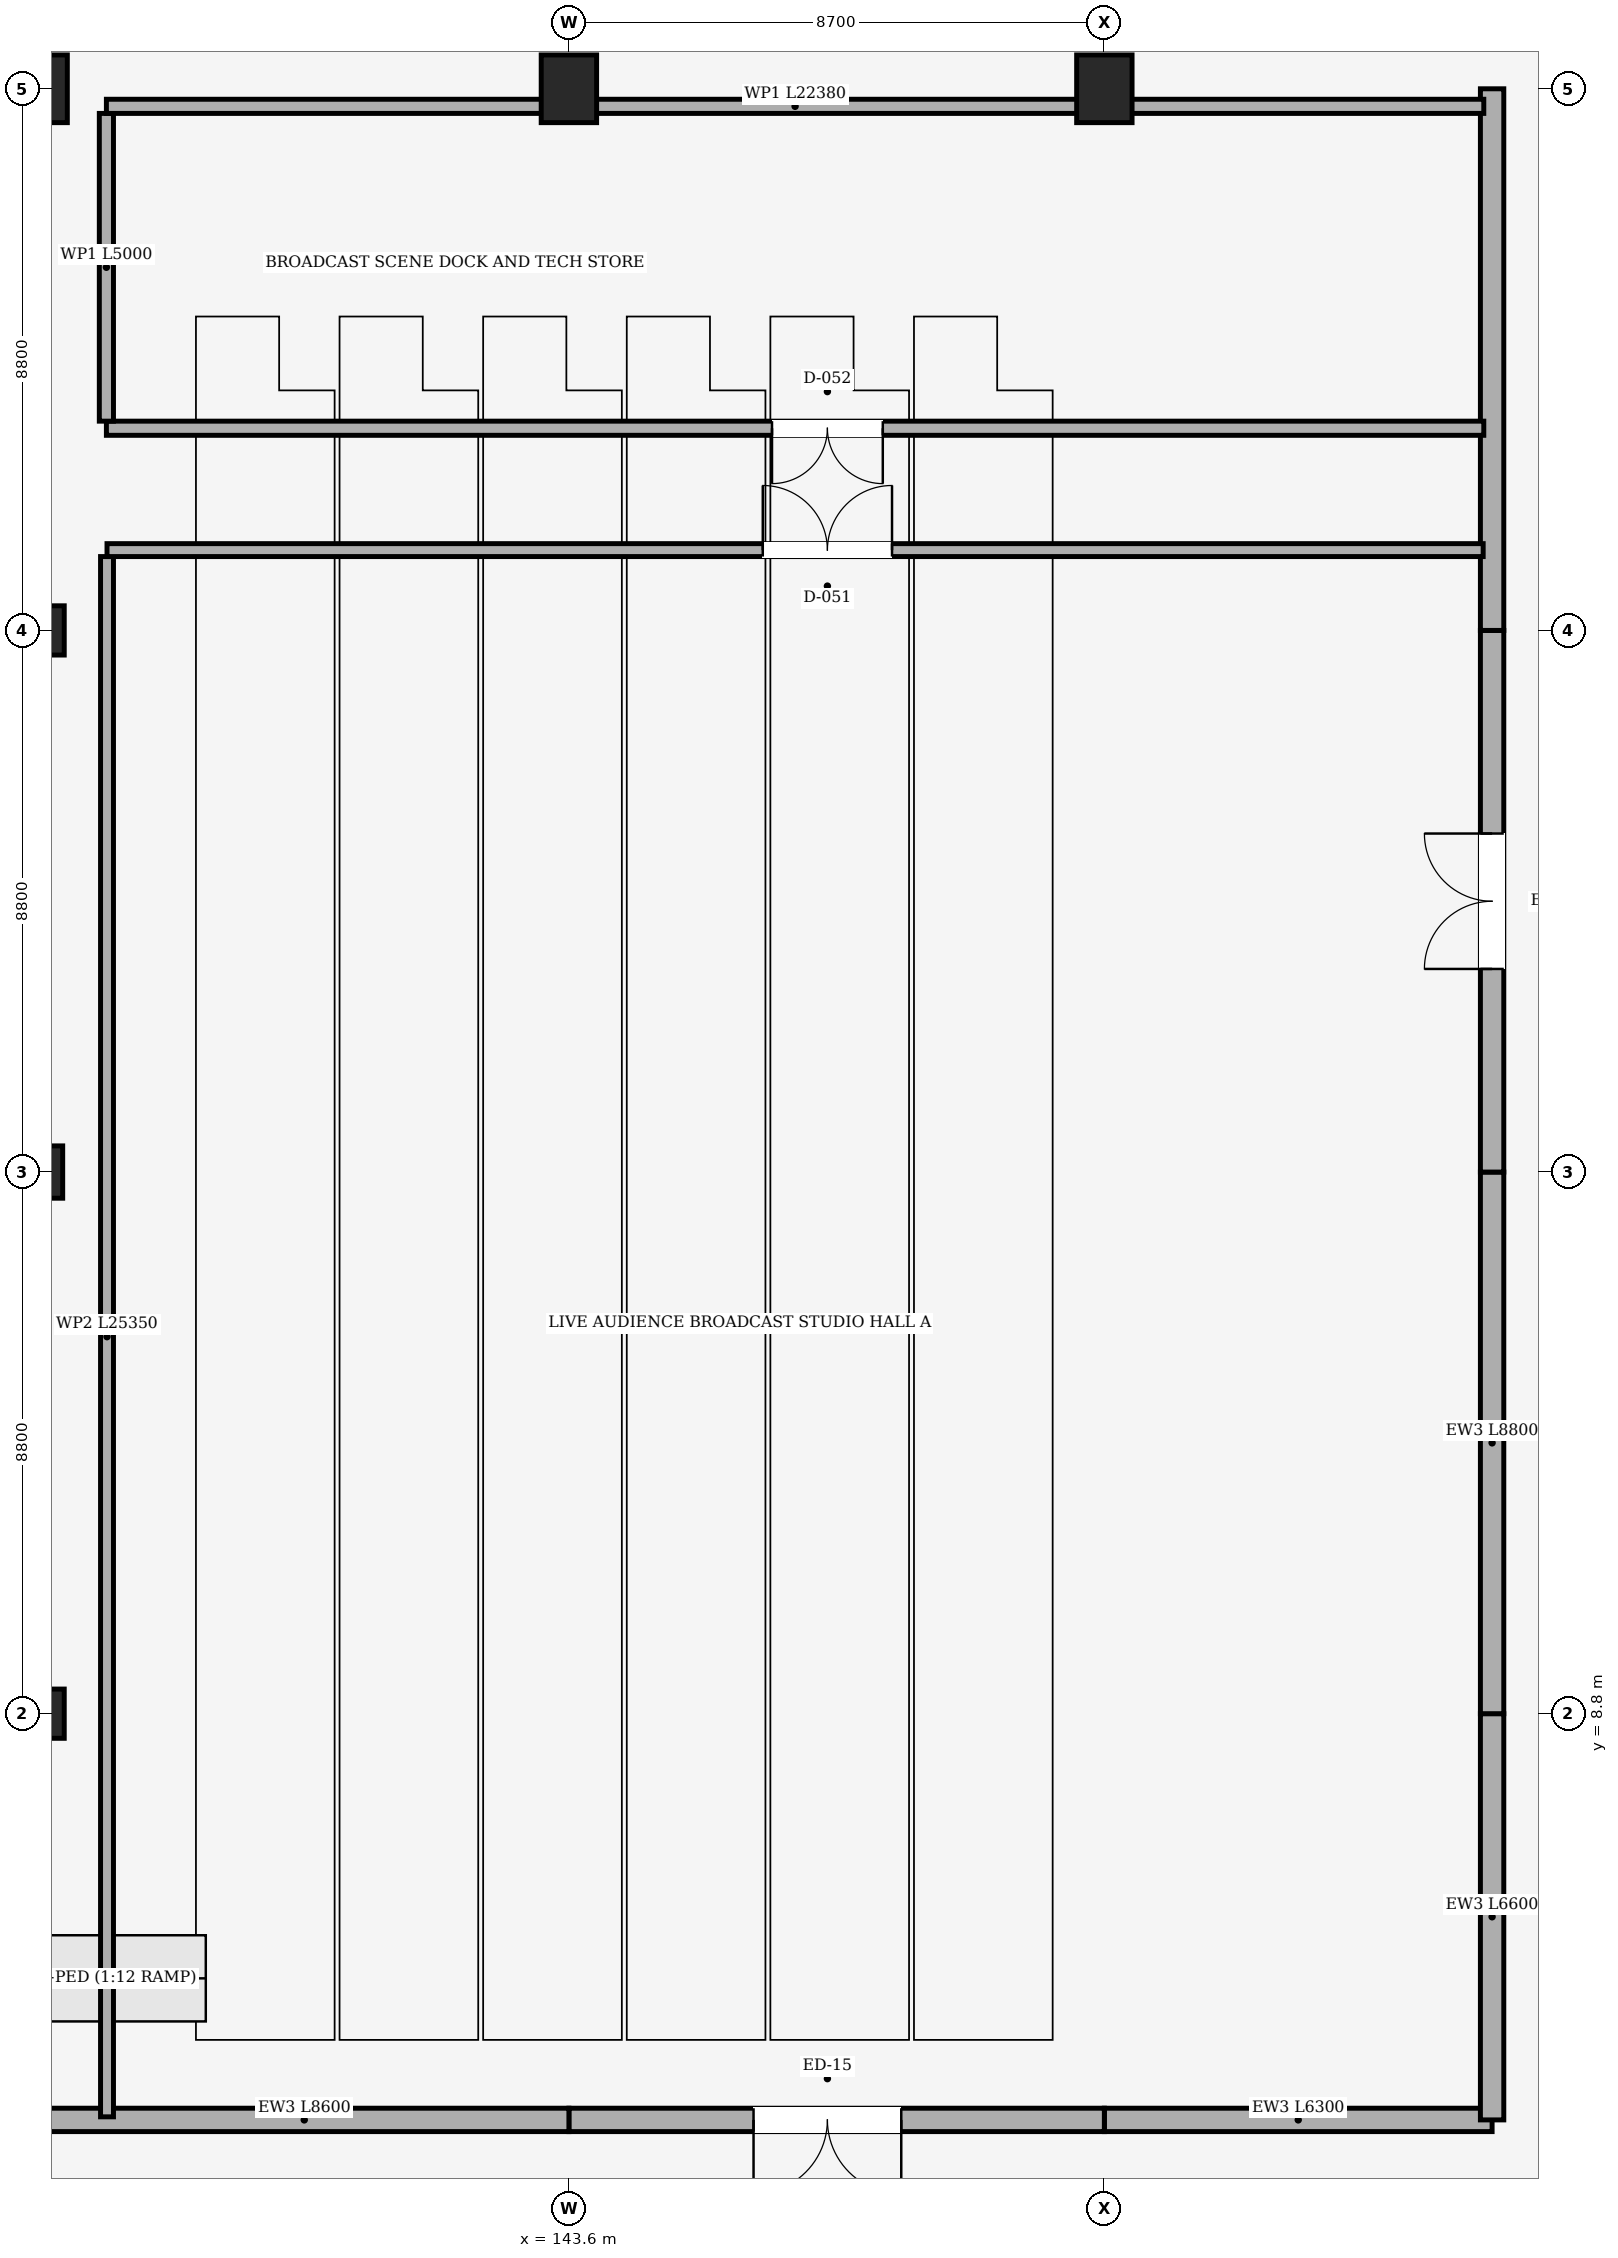
"""IFC4 building model, lengths in metres.
Left out: names, types, materials, properties, quantities, classifications, styles, units other than length and angle.
Written with IfcOpenShell. Run it as: python <this file> out.ifc"""

import sys

from ifc_helpers import new_model, si_unit, direction, frame, frame_2d, origin, origin_2d, place, context, subcontext, project, spatial, rectangle, extrude, element, fill, save


model = new_model("IFC4")
c1 = context("Model", 3, precision=1e-05, world=origin(), true_north=direction((0.0, 1.0)))
c2 = subcontext(c1, "Body", "Model", "MODEL_VIEW")
j1 = project(units=[si_unit("LENGTHUNIT", "METRE"), si_unit("PLANEANGLEUNIT", "RADIAN")], contexts=[c1])
p1 = place(None, origin())
s1 = spatial("IfcSite", under=j1, at=p1, CompositionType="ELEMENT")
p2 = place(p1, origin())
s2 = spatial("IfcBuilding", under=s1, at=p2, CompositionType="ELEMENT")
p3 = place(p2, origin())
s3 = spatial("IfcBuildingStorey", under=s2, at=p3, CompositionType="ELEMENT", Elevation=0.0)
p4 = place(p3, frame((135.0, 8.8, 0.0), z_axis=(0.0, 0.0, 1.0), x_axis=(1.0, 0.0, 0.0)))
e1 = element("IfcColumn", 1, at=p4, inside=s3, PredefinedType="COLUMN", context=c2, shape_type="SweptSolid", body=[
    extrude(rectangle(XDim=0.8, YDim=0.8, at=origin_2d()), origin(), (0.0, 0.0, 1.0), 4.5),
])
p5 = place(p3, frame((135.0, 17.6, 0.0), z_axis=(0.0, 0.0, 1.0), x_axis=(1.0, 0.0, 0.0)))
e2 = element("IfcColumn", 2, at=p5, inside=s3, PredefinedType="COLUMN", context=c2, shape_type="SweptSolid", body=[
    extrude(rectangle(XDim=0.75, YDim=0.85, at=origin_2d()), origin(), (0.0, 0.0, 1.0), 4.5),
])
p6 = place(p3, frame((135.0, 26.4, 0.0), z_axis=(0.0, 0.0, 1.0), x_axis=(1.0, 0.0, 0.0)))
e3 = element("IfcColumn", 3, at=p6, inside=s3, PredefinedType="COLUMN", context=c2, shape_type="SweptSolid", body=[
    extrude(rectangle(XDim=0.8, YDim=0.8, at=origin_2d()), origin(), (0.0, 0.0, 1.0), 4.5),
])
for number, where, z_axis, x_axis in (
    (4, (135.0, 35.2, 0.0), (0.0, 0.0, 1.0), (1.0, 0.0, 0.0)),
    (5, (143.6, 35.2, 0.0), (0.0, 0.0, 1.0), (1.0, 0.0, 0.0)),
    (6, (152.3, 35.2, 0.0), (0.0, 0.0, 1.0), (1.0, 0.0, 0.0)),
):
    element("IfcColumn", number, at=place(p3, frame(where, z_axis=z_axis, x_axis=x_axis)), inside=s3, PredefinedType="COLUMN", context=c2, shape_type="SweptSolid", body=[
        extrude(rectangle(XDim=0.9, YDim=1.1, at=origin_2d()), origin(), (0.0, 0.0, 1.0), 4.25),
    ])
p7 = place(p3, frame((158.6, 2.2, 0.0), z_axis=(0.0, 0.0, 1.0), x_axis=(-1.0, 0.0, 0.0)))
e7 = element("IfcWall", 7, at=p7, inside=s3, PredefinedType="SOLIDWALL", context=c2, shape_type="SweptSolid", body=[
    extrude(rectangle(XDim=6.3, YDim=0.38, at=frame_2d((3.15, 0.0))), origin(), (0.0, 0.0, 1.0), 4.235),
])
p8 = place(p3, frame((152.3, 2.2, 0.0), z_axis=(0.0, 0.0, 1.0), x_axis=(-1.0, 0.0, 0.0)))
e8 = element("IfcWall", 8, at=p8, inside=s3, PredefinedType="SOLIDWALL", context=c2, shape_type="SweptSolid", body=[
    extrude(rectangle(XDim=8.7, YDim=0.38, at=frame_2d((4.35, 0.0))), origin(), (0.0, 0.0, 1.0), 4.235),
])
p9 = place(p8, frame((3.3, 0.0, 0.0)))
e9 = element("IfcOpeningElement", 9, at=p9, cuts=e8, PredefinedType="OPENING", context=c2, shape_type="SweptSolid", body=[
    extrude(rectangle(XDim=2.4, YDim=2.3, at=frame_2d((1.2, 1.15))), frame((0.0, 0.19, 0.0), z_axis=(0.0, -1.0, 0.0), x_axis=(1.0, 0.0, 0.0)), (0.0, 0.0, 1.0), 0.38),
])
p10 = place(p3, frame((143.6, 2.2, 0.0), z_axis=(0.0, 0.0, 1.0), x_axis=(-1.0, 0.0, 0.0)))
e10 = element("IfcWall", 10, at=p10, inside=s3, PredefinedType="SOLIDWALL", context=c2, shape_type="SweptSolid", body=[
    extrude(rectangle(XDim=8.6, YDim=0.38, at=frame_2d((4.3, 0.0))), origin(), (0.0, 0.0, 1.0), 4.235),
])
p11 = place(p3, frame((158.6, 2.2, 0.0), z_axis=(0.0, 0.0, 1.0), x_axis=(0.0, 1.0, 0.0)))
e11 = element("IfcWall", 11, at=p11, inside=s3, PredefinedType="SOLIDWALL", context=c2, shape_type="SweptSolid", body=[
    extrude(rectangle(XDim=6.6, YDim=0.38, at=frame_2d((3.3, 0.0))), origin(), (0.0, 0.0, 1.0), 4.235),
])
p12 = place(p3, frame((158.6, 8.8, 0.0), z_axis=(0.0, 0.0, 1.0), x_axis=(0.0, 1.0, 0.0)))
e12 = element("IfcWall", 12, at=p12, inside=s3, PredefinedType="SOLIDWALL", context=c2, shape_type="SweptSolid", body=[
    extrude(rectangle(XDim=8.8, YDim=0.38, at=frame_2d((4.4, 0.0))), origin(), (0.0, 0.0, 1.0), 4.235),
])
p13 = place(p3, frame((158.6, 17.6, 0.0), z_axis=(0.0, 0.0, 1.0), x_axis=(0.0, 1.0, 0.0)))
e13 = element("IfcWall", 13, at=p13, inside=s3, PredefinedType="SOLIDWALL", context=c2, shape_type="SweptSolid", body=[
    extrude(rectangle(XDim=8.8, YDim=0.38, at=frame_2d((4.4, 0.0))), origin(), (0.0, 0.0, 1.0), 4.235),
])
p14 = place(p13, frame((3.3, 0.0, 0.0)))
e14 = element("IfcOpeningElement", 14, at=p14, cuts=e13, PredefinedType="OPENING", context=c2, shape_type="SweptSolid", body=[
    extrude(rectangle(XDim=2.2, YDim=2.25, at=frame_2d((1.1, 1.125))), frame((0.0, 0.19, 0.0), z_axis=(0.0, -1.0, 0.0), x_axis=(1.0, 0.0, 0.0)), (0.0, 0.0, 1.0), 0.38),
])
p15 = place(p3, frame((158.6, 26.4, 0.0), z_axis=(0.0, 0.0, 1.0), x_axis=(0.0, 1.0, 0.0)))
e15 = element("IfcWall", 15, at=p15, inside=s3, PredefinedType="SOLIDWALL", context=c2, shape_type="SweptSolid", body=[
    extrude(rectangle(XDim=8.8, YDim=0.38, at=frame_2d((4.4, 0.0))), origin(), (0.0, 0.0, 1.0), 4.235),
])
p16 = place(p3, frame((136.095, 2.25, 0.0), z_axis=(0.0, 0.0, 1.0), x_axis=(0.0, 1.0, 0.0)))
e16 = element("IfcWall", 16, at=p16, inside=s3, PredefinedType="PARTITIONING", context=c2, shape_type="SweptSolid", body=[
    extrude(rectangle(XDim=25.35, YDim=0.21, at=frame_2d((12.675, 0.0))), origin(), (0.0, 0.0, 1.0), 4.23),
])
p17 = place(p3, frame((136.095, 27.705, 0.0), z_axis=(0.0, 0.0, 1.0), x_axis=(1.0, 0.0, 0.0)))
e17 = element("IfcWall", 17, at=p17, inside=s3, PredefinedType="PARTITIONING", context=c2, shape_type="SweptSolid", body=[
    extrude(rectangle(XDim=22.36, YDim=0.21, at=frame_2d((11.18, 0.0))), origin(), (0.0, 0.0, 1.0), 4.23),
])
p18 = place(p17, frame((10.655, 0.0, 0.0)))
e18 = element("IfcOpeningElement", 18, at=p18, cuts=e17, PredefinedType="OPENING", context=c2, shape_type="SweptSolid", body=[
    extrude(rectangle(XDim=2.1, YDim=2.3, at=frame_2d((1.05, 1.15))), frame((0.0, 0.105, 0.0), z_axis=(0.0, -1.0, 0.0), x_axis=(1.0, 0.0, 0.0)), (0.0, 0.0, 1.0), 0.21),
])
p19 = place(p3, frame((158.465, 29.685, 0.0), z_axis=(0.0, 0.0, 1.0), x_axis=(-1.0, 0.0, 0.0)))
e19 = element("IfcWall", 19, at=p19, inside=s3, PredefinedType="PARTITIONING", context=c2, shape_type="SweptSolid", body=[
    extrude(rectangle(XDim=22.38, YDim=0.23, at=frame_2d((11.19, 0.0))), origin(), (0.0, 0.0, 1.0), 4.23),
])
p20 = place(p19, frame((9.765, 0.0, 0.0)))
e20 = element("IfcOpeningElement", 20, at=p20, cuts=e19, PredefinedType="OPENING", context=c2, shape_type="SweptSolid", body=[
    extrude(rectangle(XDim=1.8, YDim=2.25, at=frame_2d((0.9, 1.125))), frame((0.0, 0.115, 0.0), z_axis=(0.0, -1.0, 0.0), x_axis=(1.0, 0.0, 0.0)), (0.0, 0.0, 1.0), 0.23),
])
p21 = place(p3, frame((136.085, 29.8, 0.0), z_axis=(0.0, 0.0, 1.0), x_axis=(0.0, 1.0, 0.0)))
e21 = element("IfcWall", 21, at=p21, inside=s3, PredefinedType="PARTITIONING", context=c2, shape_type="SweptSolid", body=[
    extrude(rectangle(XDim=5.0, YDim=0.23, at=frame_2d((2.5, 0.0))), origin(), (0.0, 0.0, 1.0), 4.23),
])
p22 = place(p3, frame((136.085, 34.915, 0.0), z_axis=(0.0, 0.0, 1.0), x_axis=(1.0, 0.0, 0.0)))
e22 = element("IfcWall", 22, at=p22, inside=s3, PredefinedType="PARTITIONING", context=c2, shape_type="SweptSolid", body=[
    extrude(rectangle(XDim=22.38, YDim=0.23, at=frame_2d((11.19, 0.0))), origin(), (0.0, 0.0, 1.0), 3.48),
])
p23 = place(p9, origin())
e23 = element("IfcDoor", 23, at=p23, inside=s3, OperationType="DOUBLE_DOOR_SINGLE_SWING", PredefinedType="DOOR", context=c2, shape_type="SweptSolid", body=[
    extrude(rectangle(XDim=2.4, YDim=2.3, at=frame_2d((1.2, 1.15))), frame((0.0, 0.025, 0.0), z_axis=(0.0, -1.0, 0.0), x_axis=(1.0, 0.0, 0.0)), (0.0, 0.0, 1.0), 0.05),
])
fill(e9, e23)
p24 = place(p14, origin())
e24 = element("IfcDoor", 24, at=p24, inside=s3, OperationType="DOUBLE_DOOR_SINGLE_SWING", PredefinedType="DOOR", context=c2, shape_type="SweptSolid", body=[
    extrude(rectangle(XDim=2.2, YDim=2.25, at=frame_2d((1.1, 1.125))), frame((0.0, 0.025, 0.0), z_axis=(0.0, -1.0, 0.0), x_axis=(1.0, 0.0, 0.0)), (0.0, 0.0, 1.0), 0.05),
])
fill(e14, e24)
p25 = place(p18, origin())
e25 = element("IfcDoor", 25, at=p25, inside=s3, OperationType="DOUBLE_DOOR_SINGLE_SWING", PredefinedType="DOOR", context=c2, shape_type="SweptSolid", body=[
    extrude(rectangle(XDim=2.1, YDim=2.3, at=frame_2d((1.05, 1.15))), frame((0.0, 0.025, 0.0), z_axis=(0.0, -1.0, 0.0), x_axis=(1.0, 0.0, 0.0)), (0.0, 0.0, 1.0), 0.05),
])
fill(e18, e25)
p26 = place(p20, origin())
e26 = element("IfcDoor", 26, at=p26, inside=s3, OperationType="DOUBLE_DOOR_SINGLE_SWING", PredefinedType="DOOR", context=c2, shape_type="SweptSolid", body=[
    extrude(rectangle(XDim=1.8, YDim=2.25, at=frame_2d((0.9, 1.125))), frame((0.0, 0.025, 0.0), z_axis=(0.0, -1.0, 0.0), x_axis=(1.0, 0.0, 0.0)), (0.0, 0.0, 1.0), 0.05),
])
fill(e20, e26)
save(model, sys.argv[1])
